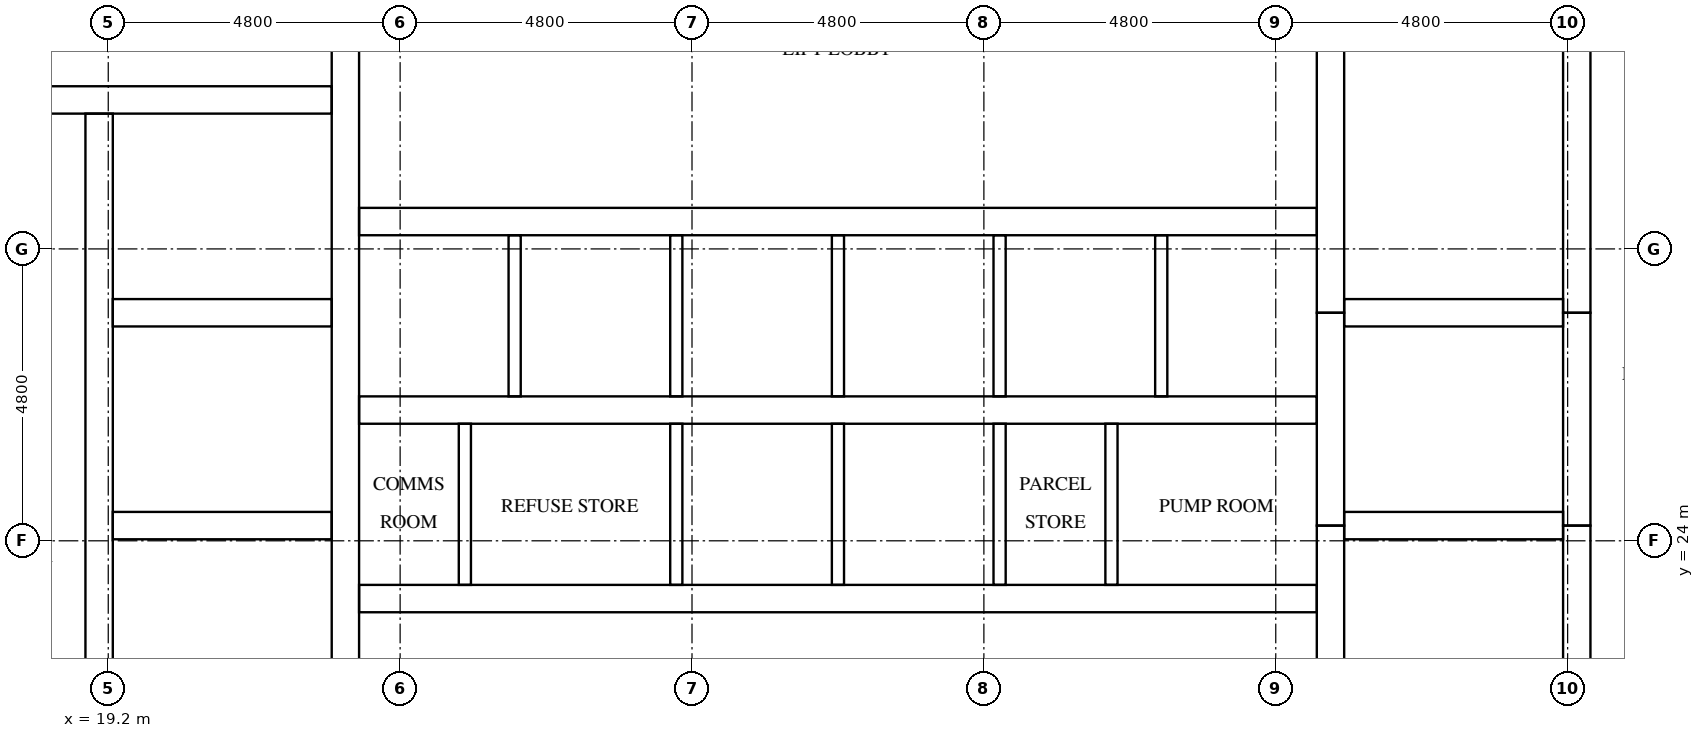
"""IFC4 building model, lengths in metres.
Left out: names, types, materials, properties, quantities, classifications, styles, units other than length and angle.
Written with IfcOpenShell. Run it as: python <this file> out.ifc"""

import sys

from ifc_helpers import new_model, si_unit, direction, frame, frame_2d, origin, place, context, subcontext, project, spatial, rectangle, extrude, element, fill, save


model = new_model("IFC4")
c1 = context("Model", 3, precision=1e-05, world=origin(), true_north=direction((0.0, 1.0)))
c2 = subcontext(c1, "Body", "Model", "MODEL_VIEW")
j1 = project(units=[si_unit("LENGTHUNIT", "METRE"), si_unit("PLANEANGLEUNIT", "RADIAN")], contexts=[c1])
p1 = place(None, origin())
s1 = spatial("IfcSite", under=j1, at=p1, CompositionType="ELEMENT")
p2 = place(p1, origin())
s2 = spatial("IfcBuilding", under=s1, at=p2, CompositionType="ELEMENT")
p3 = place(p2, frame((0.0, 0.0, 256.2)))
s3 = spatial("IfcBuildingStorey", under=s2, at=p3, CompositionType="ELEMENT", Elevation=256.2)
p4 = place(p3, frame((19.05, 15.6, 0.0), z_axis=(0.0, 0.0, 1.0), x_axis=(0.0, 1.0, 0.0)))
e1 = element("IfcWall", 1, at=p4, inside=s3, PredefinedType="SHEAR", context=c2, shape_type="SweptSolid", body=[
    extrude(rectangle(XDim=15.425, YDim=0.45, at=frame_2d((7.712, 0.0))), origin(), (0.0, 0.0, 1.0), 3.2),
])
p5 = place(p4, frame((9.85, 0.0, 0.0)))
e2 = element("IfcOpeningElement", 2, at=p5, cuts=e1, PredefinedType="OPENING", context=c2, shape_type="SweptSolid", body=[
    extrude(rectangle(XDim=1.1, YDim=2.1, at=frame_2d((0.55, 1.05))), frame((0.0, 0.235, 0.0), z_axis=(0.0, -1.0, 0.0), x_axis=(1.0, 0.0, 0.0)), (0.0, 0.0, 1.0), 0.47),
])
p6 = place(p4, frame((13.35, 0.0, 0.0)))
e3 = element("IfcOpeningElement", 3, at=p6, cuts=e1, PredefinedType="OPENING", context=c2, shape_type="SweptSolid", body=[
    extrude(rectangle(XDim=1.1, YDim=2.1, at=frame_2d((0.55, 1.05))), frame((0.0, 0.235, 0.0), z_axis=(0.0, -1.0, 0.0), x_axis=(1.0, 0.0, 0.0)), (0.0, 0.0, 1.0), 0.47),
])
p7 = place(p4, frame((0.6, 0.0, 0.0)))
e4 = element("IfcOpeningElement", 4, at=p7, cuts=e1, PredefinedType="OPENING", context=c2, shape_type="SweptSolid", body=[
    extrude(rectangle(XDim=1.2, YDim=2.1, at=frame_2d((0.6, 1.05))), frame((0.0, 0.235, 0.0), z_axis=(0.0, -1.0, 0.0), x_axis=(1.0, 0.0, 0.0)), (0.0, 0.0, 1.0), 0.47),
])
p8 = place(p3, frame((23.1, 15.6, 0.0), z_axis=(0.0, 0.0, 1.0), x_axis=(0.0, 1.0, 0.0)))
e5 = element("IfcWall", 5, at=p8, inside=s3, PredefinedType="SHEAR", context=c2, shape_type="SweptSolid", body=[
    extrude(rectangle(XDim=21.6, YDim=0.45, at=frame_2d((10.8, 0.0))), origin(), (0.0, 0.0, 1.0), 3.2),
])
p9 = place(p3, frame((39.3, 15.6, 0.0), z_axis=(0.0, 0.0, 1.0), x_axis=(0.0, 1.0, 0.0)))
e6 = element("IfcWall", 6, at=p9, inside=s3, PredefinedType="SHEAR", context=c2, shape_type="SweptSolid", body=[
    extrude(rectangle(XDim=8.65, YDim=0.45, at=frame_2d((4.325, 0.0))), origin(), (0.0, 0.0, 1.0), 3.2),
])
p10 = place(p3, frame((39.3, 24.25, 0.0), z_axis=(0.0, 0.0, 1.0), x_axis=(0.0, 1.0, 0.0)))
e7 = element("IfcWall", 7, at=p10, inside=s3, PredefinedType="SHEAR", context=c2, shape_type="SweptSolid", body=[
    extrude(rectangle(XDim=3.5, YDim=0.45, at=frame_2d((1.75, 0.0))), origin(), (0.0, 0.0, 1.0), 3.2),
])
p11 = place(p3, frame((39.3, 27.75, 0.0), z_axis=(0.0, 0.0, 1.0), x_axis=(0.0, 1.0, 0.0)))
e8 = element("IfcWall", 8, at=p11, inside=s3, PredefinedType="SHEAR", context=c2, shape_type="SweptSolid", body=[
    extrude(rectangle(XDim=9.45, YDim=0.45, at=frame_2d((4.725, 0.0))), origin(), (0.0, 0.0, 1.0), 3.2),
])
p12 = place(p3, frame((43.35, 15.6, 0.0), z_axis=(0.0, 0.0, 1.0), x_axis=(0.0, 1.0, 0.0)))
e9 = element("IfcWall", 9, at=p12, inside=s3, PredefinedType="SHEAR", context=c2, shape_type="SweptSolid", body=[
    extrude(rectangle(XDim=8.65, YDim=0.45, at=frame_2d((4.325, 0.0))), origin(), (0.0, 0.0, 1.0), 3.2),
])
p13 = place(p12, frame((0.6, 0.0, 0.0)))
e10 = element("IfcOpeningElement", 10, at=p13, cuts=e9, PredefinedType="OPENING", context=c2, shape_type="SweptSolid", body=[
    extrude(rectangle(XDim=1.2, YDim=2.1, at=frame_2d((0.6, 1.05))), frame((0.0, 0.235, 0.0), z_axis=(0.0, -1.0, 0.0), x_axis=(1.0, 0.0, 0.0)), (0.0, 0.0, 1.0), 0.47),
])
p14 = place(p3, frame((43.35, 24.25, 0.0), z_axis=(0.0, 0.0, 1.0), x_axis=(0.0, 1.0, 0.0)))
e11 = element("IfcWall", 11, at=p14, inside=s3, PredefinedType="SHEAR", context=c2, shape_type="SweptSolid", body=[
    extrude(rectangle(XDim=3.5, YDim=0.45, at=frame_2d((1.75, 0.0))), origin(), (0.0, 0.0, 1.0), 3.2),
])
p15 = place(p14, frame((1.2, 0.0, 0.0)))
e12 = element("IfcOpeningElement", 12, at=p15, cuts=e11, PredefinedType="OPENING", context=c2, shape_type="SweptSolid", body=[
    extrude(rectangle(XDim=1.1, YDim=2.1, at=frame_2d((0.55, 1.05))), frame((0.0, 0.235, 0.0), z_axis=(0.0, -1.0, 0.0), x_axis=(1.0, 0.0, 0.0)), (0.0, 0.0, 1.0), 0.47),
])
p16 = place(p3, frame((43.35, 27.75, 0.0), z_axis=(0.0, 0.0, 1.0), x_axis=(0.0, 1.0, 0.0)))
e13 = element("IfcWall", 13, at=p16, inside=s3, PredefinedType="SHEAR", context=c2, shape_type="SweptSolid", body=[
    extrude(rectangle(XDim=9.45, YDim=0.45, at=frame_2d((4.725, 0.0))), origin(), (0.0, 0.0, 1.0), 3.2),
])
p17 = place(p16, frame((7.65, 0.0, 0.0)))
e14 = element("IfcOpeningElement", 14, at=p17, cuts=e13, PredefinedType="OPENING", context=c2, shape_type="SweptSolid", body=[
    extrude(rectangle(XDim=1.2, YDim=2.1, at=frame_2d((0.6, 1.05))), frame((0.0, 0.235, 0.0), z_axis=(0.0, -1.0, 0.0), x_axis=(1.0, 0.0, 0.0)), (0.0, 0.0, 1.0), 0.47),
])
for number, where, z_axis, x_axis in (
    (15, (19.275, 24.25, 0.0), (0.0, 0.0, 1.0), (1.0, 0.0, 0.0)),
    (16, (19.275, 27.75, 0.0), (0.0, 0.0, 1.0), (1.0, 0.0, 0.0)),
):
    element("IfcWall", number, at=place(p3, frame(where, z_axis=z_axis, x_axis=x_axis)), inside=s3, PredefinedType="SHEAR", context=c2, shape_type="SweptSolid", body=[
        extrude(rectangle(XDim=3.6, YDim=0.45, at=frame_2d((1.8, 0.0))), origin(), (0.0, 0.0, 1.0), 3.2),
    ])
p18 = place(p3, frame((15.6, 31.25, 0.0), z_axis=(0.0, 0.0, 1.0), x_axis=(1.0, 0.0, 0.0)))
e17 = element("IfcWall", 17, at=p18, inside=s3, PredefinedType="SHEAR", context=c2, shape_type="SweptSolid", body=[
    extrude(rectangle(XDim=7.275, YDim=0.45, at=frame_2d((3.637, 0.0))), origin(), (0.0, 0.0, 1.0), 3.2),
])
for number, where, z_axis, x_axis in (
    (18, (39.525, 24.25, 0.0), (0.0, 0.0, 1.0), (1.0, 0.0, 0.0)),
    (19, (39.525, 27.75, 0.0), (0.0, 0.0, 1.0), (1.0, 0.0, 0.0)),
):
    element("IfcWall", number, at=place(p3, frame(where, z_axis=z_axis, x_axis=x_axis)), inside=s3, PredefinedType="SHEAR", context=c2, shape_type="SweptSolid", body=[
        extrude(rectangle(XDim=3.6, YDim=0.45, at=frame_2d((1.8, 0.0))), origin(), (0.0, 0.0, 1.0), 3.2),
    ])
p19 = place(p3, frame((23.325, 23.05, 0.0), z_axis=(0.0, 0.0, 1.0), x_axis=(1.0, 0.0, 0.0)))
e20 = element("IfcWall", 20, at=p19, inside=s3, PredefinedType="SHEAR", context=c2, shape_type="SweptSolid", body=[
    extrude(rectangle(XDim=15.75, YDim=0.45, at=frame_2d((7.875, 0.0))), origin(), (0.0, 0.0, 1.0), 3.2),
])
p20 = place(p19, frame((0.32, 0.0, 0.0)))
e21 = element("IfcOpeningElement", 21, at=p20, cuts=e20, PredefinedType="OPENING", context=c2, shape_type="SweptSolid", body=[
    extrude(rectangle(XDim=1.0, YDim=2.1, at=frame_2d((0.5, 1.05))), frame((0.0, 0.235, 0.0), z_axis=(0.0, -1.0, 0.0), x_axis=(1.0, 0.0, 0.0)), (0.0, 0.0, 1.0), 0.47),
])
p21 = place(p19, frame((2.978, 0.0, 0.0)))
e22 = element("IfcOpeningElement", 22, at=p21, cuts=e20, PredefinedType="OPENING", context=c2, shape_type="SweptSolid", body=[
    extrude(rectangle(XDim=1.0, YDim=2.1, at=frame_2d((0.5, 1.05))), frame((0.0, 0.235, 0.0), z_axis=(0.0, -1.0, 0.0), x_axis=(1.0, 0.0, 0.0)), (0.0, 0.0, 1.0), 0.47),
])
p22 = place(p19, frame((10.953, 0.0, 0.0)))
e23 = element("IfcOpeningElement", 23, at=p22, cuts=e20, PredefinedType="OPENING", context=c2, shape_type="SweptSolid", body=[
    extrude(rectangle(XDim=1.0, YDim=2.1, at=frame_2d((0.5, 1.05))), frame((0.0, 0.235, 0.0), z_axis=(0.0, -1.0, 0.0), x_axis=(1.0, 0.0, 0.0)), (0.0, 0.0, 1.0), 0.47),
])
p23 = place(p19, frame((13.612, 0.0, 0.0)))
e24 = element("IfcOpeningElement", 24, at=p23, cuts=e20, PredefinedType="OPENING", context=c2, shape_type="SweptSolid", body=[
    extrude(rectangle(XDim=1.0, YDim=2.1, at=frame_2d((0.5, 1.05))), frame((0.0, 0.235, 0.0), z_axis=(0.0, -1.0, 0.0), x_axis=(1.0, 0.0, 0.0)), (0.0, 0.0, 1.0), 0.47),
])
p24 = place(p3, frame((23.325, 26.15, 0.0), z_axis=(0.0, 0.0, 1.0), x_axis=(1.0, 0.0, 0.0)))
e25 = element("IfcWall", 25, at=p24, inside=s3, PredefinedType="SHEAR", context=c2, shape_type="SweptSolid", body=[
    extrude(rectangle(XDim=15.75, YDim=0.45, at=frame_2d((7.875, 0.0))), origin(), (0.0, 0.0, 1.0), 3.2),
])
p25 = place(p3, frame((23.325, 29.25, 0.0), z_axis=(0.0, 0.0, 1.0), x_axis=(1.0, 0.0, 0.0)))
e26 = element("IfcWall", 26, at=p25, inside=s3, PredefinedType="SHEAR", context=c2, shape_type="SweptSolid", body=[
    extrude(rectangle(XDim=15.75, YDim=0.45, at=frame_2d((7.875, 0.0))), origin(), (0.0, 0.0, 1.0), 3.2),
])
p26 = place(p25, frame((0.679, 0.0, 0.0)))
e27 = element("IfcOpeningElement", 27, at=p26, cuts=e26, PredefinedType="OPENING", context=c2, shape_type="SweptSolid", body=[
    extrude(rectangle(XDim=1.1, YDim=2.1, at=frame_2d((0.55, 1.05))), frame((0.0, 0.235, 0.0), z_axis=(0.0, -1.0, 0.0), x_axis=(1.0, 0.0, 0.0)), (0.0, 0.0, 1.0), 0.47),
])
p27 = place(p25, frame((3.337, 0.0, 0.0)))
e28 = element("IfcOpeningElement", 28, at=p27, cuts=e26, PredefinedType="OPENING", context=c2, shape_type="SweptSolid", body=[
    extrude(rectangle(XDim=1.1, YDim=2.1, at=frame_2d((0.55, 1.05))), frame((0.0, 0.235, 0.0), z_axis=(0.0, -1.0, 0.0), x_axis=(1.0, 0.0, 0.0)), (0.0, 0.0, 1.0), 0.47),
])
p28 = place(p25, frame((5.996, 0.0, 0.0)))
e29 = element("IfcOpeningElement", 29, at=p28, cuts=e26, PredefinedType="OPENING", context=c2, shape_type="SweptSolid", body=[
    extrude(rectangle(XDim=1.1, YDim=2.1, at=frame_2d((0.55, 1.05))), frame((0.0, 0.235, 0.0), z_axis=(0.0, -1.0, 0.0), x_axis=(1.0, 0.0, 0.0)), (0.0, 0.0, 1.0), 0.47),
])
p29 = place(p25, frame((8.654, 0.0, 0.0)))
e30 = element("IfcOpeningElement", 30, at=p29, cuts=e26, PredefinedType="OPENING", context=c2, shape_type="SweptSolid", body=[
    extrude(rectangle(XDim=1.1, YDim=2.1, at=frame_2d((0.55, 1.05))), frame((0.0, 0.235, 0.0), z_axis=(0.0, -1.0, 0.0), x_axis=(1.0, 0.0, 0.0)), (0.0, 0.0, 1.0), 0.47),
])
p30 = place(p25, frame((11.312, 0.0, 0.0)))
e31 = element("IfcOpeningElement", 31, at=p30, cuts=e26, PredefinedType="OPENING", context=c2, shape_type="SweptSolid", body=[
    extrude(rectangle(XDim=1.1, YDim=2.1, at=frame_2d((0.55, 1.05))), frame((0.0, 0.235, 0.0), z_axis=(0.0, -1.0, 0.0), x_axis=(1.0, 0.0, 0.0)), (0.0, 0.0, 1.0), 0.47),
])
p31 = place(p25, frame((13.971, 0.0, 0.0)))
e32 = element("IfcOpeningElement", 32, at=p31, cuts=e26, PredefinedType="OPENING", context=c2, shape_type="SweptSolid", body=[
    extrude(rectangle(XDim=1.1, YDim=2.1, at=frame_2d((0.55, 1.05))), frame((0.0, 0.235, 0.0), z_axis=(0.0, -1.0, 0.0), x_axis=(1.0, 0.0, 0.0)), (0.0, 0.0, 1.0), 0.47),
])
p32 = place(p3, frame((25.883, 26.375, 0.0), z_axis=(0.0, 0.0, 1.0), x_axis=(0.0, 1.0, 0.0)))
e33 = element("IfcWall", 33, at=p32, inside=s3, PredefinedType="SOLIDWALL", context=c2, shape_type="SweptSolid", body=[
    extrude(rectangle(XDim=2.65, YDim=0.2, at=frame_2d((1.325, 0.0))), origin(), (0.0, 0.0, 1.0), 3.2),
])
p33 = place(p3, frame((28.542, 23.275, 0.0), z_axis=(0.0, 0.0, 1.0), x_axis=(0.0, 1.0, 0.0)))
e34 = element("IfcWall", 34, at=p33, inside=s3, PredefinedType="SOLIDWALL", context=c2, shape_type="SweptSolid", body=[
    extrude(rectangle(XDim=2.65, YDim=0.2, at=frame_2d((1.325, 0.0))), origin(), (0.0, 0.0, 1.0), 3.2),
])
p34 = place(p3, frame((28.542, 26.375, 0.0), z_axis=(0.0, 0.0, 1.0), x_axis=(0.0, 1.0, 0.0)))
e35 = element("IfcWall", 35, at=p34, inside=s3, PredefinedType="SOLIDWALL", context=c2, shape_type="SweptSolid", body=[
    extrude(rectangle(XDim=2.65, YDim=0.2, at=frame_2d((1.325, 0.0))), origin(), (0.0, 0.0, 1.0), 3.2),
])
p35 = place(p3, frame((31.2, 23.275, 0.0), z_axis=(0.0, 0.0, 1.0), x_axis=(0.0, 1.0, 0.0)))
e36 = element("IfcWall", 36, at=p35, inside=s3, PredefinedType="SOLIDWALL", context=c2, shape_type="SweptSolid", body=[
    extrude(rectangle(XDim=2.65, YDim=0.2, at=frame_2d((1.325, 0.0))), origin(), (0.0, 0.0, 1.0), 3.2),
])
p36 = place(p3, frame((31.2, 26.375, 0.0), z_axis=(0.0, 0.0, 1.0), x_axis=(0.0, 1.0, 0.0)))
e37 = element("IfcWall", 37, at=p36, inside=s3, PredefinedType="SOLIDWALL", context=c2, shape_type="SweptSolid", body=[
    extrude(rectangle(XDim=2.65, YDim=0.2, at=frame_2d((1.325, 0.0))), origin(), (0.0, 0.0, 1.0), 3.2),
])
p37 = place(p3, frame((33.858, 23.275, 0.0), z_axis=(0.0, 0.0, 1.0), x_axis=(0.0, 1.0, 0.0)))
e38 = element("IfcWall", 38, at=p37, inside=s3, PredefinedType="SOLIDWALL", context=c2, shape_type="SweptSolid", body=[
    extrude(rectangle(XDim=2.65, YDim=0.2, at=frame_2d((1.325, 0.0))), origin(), (0.0, 0.0, 1.0), 3.2),
])
for number, where, z_axis, x_axis in (
    (39, (33.858, 26.375, 0.0), (0.0, 0.0, 1.0), (0.0, 1.0, 0.0)),
    (40, (36.517, 26.375, 0.0), (0.0, 0.0, 1.0), (0.0, 1.0, 0.0)),
):
    element("IfcWall", number, at=place(p3, frame(where, z_axis=z_axis, x_axis=x_axis)), inside=s3, PredefinedType="SOLIDWALL", context=c2, shape_type="SweptSolid", body=[
        extrude(rectangle(XDim=2.65, YDim=0.2, at=frame_2d((1.325, 0.0))), origin(), (0.0, 0.0, 1.0), 3.2),
    ])
for number, where, z_axis, x_axis in (
    (41, (25.065, 23.275, 0.0), (0.0, 0.0, 1.0), (0.0, 1.0, 0.0)),
    (42, (35.698, 23.275, 0.0), (0.0, 0.0, 1.0), (0.0, 1.0, 0.0)),
):
    element("IfcWall", number, at=place(p3, frame(where, z_axis=z_axis, x_axis=x_axis)), inside=s3, PredefinedType="PARTITIONING", context=c2, shape_type="SweptSolid", body=[
        extrude(rectangle(XDim=2.65, YDim=0.2, at=frame_2d((1.325, 0.0))), origin(), (0.0, 0.0, 1.0), 3.2),
    ])
p38 = place(p26, origin())
e43 = element("IfcDoor", 43, at=p38, inside=s3, OperationType="DOUBLE_DOOR_SLIDING", PredefinedType="DOOR", context=c2, shape_type="SweptSolid", body=[
    extrude(rectangle(XDim=1.1, YDim=2.1, at=frame_2d((0.55, 1.05))), frame((0.0, 0.025, 0.0), z_axis=(0.0, -1.0, 0.0), x_axis=(1.0, 0.0, 0.0)), (0.0, 0.0, 1.0), 0.05),
])
fill(e27, e43)
p39 = place(p27, origin())
e44 = element("IfcDoor", 44, at=p39, inside=s3, OperationType="DOUBLE_DOOR_SLIDING", PredefinedType="DOOR", context=c2, shape_type="SweptSolid", body=[
    extrude(rectangle(XDim=1.1, YDim=2.1, at=frame_2d((0.55, 1.05))), frame((0.0, 0.025, 0.0), z_axis=(0.0, -1.0, 0.0), x_axis=(1.0, 0.0, 0.0)), (0.0, 0.0, 1.0), 0.05),
])
fill(e28, e44)
p40 = place(p28, origin())
e45 = element("IfcDoor", 45, at=p40, inside=s3, OperationType="DOUBLE_DOOR_SLIDING", PredefinedType="DOOR", context=c2, shape_type="SweptSolid", body=[
    extrude(rectangle(XDim=1.1, YDim=2.1, at=frame_2d((0.55, 1.05))), frame((0.0, 0.025, 0.0), z_axis=(0.0, -1.0, 0.0), x_axis=(1.0, 0.0, 0.0)), (0.0, 0.0, 1.0), 0.05),
])
fill(e29, e45)
p41 = place(p29, origin())
e46 = element("IfcDoor", 46, at=p41, inside=s3, OperationType="DOUBLE_DOOR_SLIDING", PredefinedType="DOOR", context=c2, shape_type="SweptSolid", body=[
    extrude(rectangle(XDim=1.1, YDim=2.1, at=frame_2d((0.55, 1.05))), frame((0.0, 0.025, 0.0), z_axis=(0.0, -1.0, 0.0), x_axis=(1.0, 0.0, 0.0)), (0.0, 0.0, 1.0), 0.05),
])
fill(e30, e46)
p42 = place(p30, origin())
e47 = element("IfcDoor", 47, at=p42, inside=s3, OperationType="DOUBLE_DOOR_SLIDING", PredefinedType="DOOR", context=c2, shape_type="SweptSolid", body=[
    extrude(rectangle(XDim=1.1, YDim=2.1, at=frame_2d((0.55, 1.05))), frame((0.0, 0.025, 0.0), z_axis=(0.0, -1.0, 0.0), x_axis=(1.0, 0.0, 0.0)), (0.0, 0.0, 1.0), 0.05),
])
fill(e31, e47)
p43 = place(p31, origin())
e48 = element("IfcDoor", 48, at=p43, inside=s3, OperationType="DOUBLE_DOOR_SLIDING", PredefinedType="DOOR", context=c2, shape_type="SweptSolid", body=[
    extrude(rectangle(XDim=1.1, YDim=2.1, at=frame_2d((0.55, 1.05))), frame((0.0, 0.025, 0.0), z_axis=(0.0, -1.0, 0.0), x_axis=(1.0, 0.0, 0.0)), (0.0, 0.0, 1.0), 0.05),
])
fill(e32, e48)
p44 = place(p5, origin())
e49 = element("IfcDoor", 49, at=p44, inside=s3, OperationType="DOUBLE_DOOR_SLIDING", PredefinedType="DOOR", context=c2, shape_type="SweptSolid", body=[
    extrude(rectangle(XDim=1.1, YDim=2.1, at=frame_2d((0.55, 1.05))), frame((0.0, 0.025, 0.0), z_axis=(0.0, -1.0, 0.0), x_axis=(1.0, 0.0, 0.0)), (0.0, 0.0, 1.0), 0.05),
])
fill(e2, e49)
p45 = place(p6, origin())
e50 = element("IfcDoor", 50, at=p45, inside=s3, OperationType="DOUBLE_DOOR_SLIDING", PredefinedType="DOOR", context=c2, shape_type="SweptSolid", body=[
    extrude(rectangle(XDim=1.1, YDim=2.1, at=frame_2d((0.55, 1.05))), frame((0.0, 0.025, 0.0), z_axis=(0.0, -1.0, 0.0), x_axis=(1.0, 0.0, 0.0)), (0.0, 0.0, 1.0), 0.05),
])
fill(e3, e50)
p46 = place(p15, origin())
e51 = element("IfcDoor", 51, at=p46, inside=s3, OperationType="DOUBLE_DOOR_SLIDING", PredefinedType="DOOR", context=c2, shape_type="SweptSolid", body=[
    extrude(rectangle(XDim=1.1, YDim=2.1, at=frame_2d((0.55, 1.05))), frame((0.0, 0.025, 0.0), z_axis=(0.0, -1.0, 0.0), x_axis=(1.0, 0.0, 0.0)), (0.0, 0.0, 1.0), 0.05),
])
fill(e12, e51)
p47 = place(p20, frame((1.0, 0.0, 0.0), z_axis=(0.0, 0.0, 1.0), x_axis=(-1.0, 0.0, 0.0)))
e52 = element("IfcDoor", 52, at=p47, inside=s3, OperationType="SINGLE_SWING_RIGHT", PredefinedType="DOOR", context=c2, shape_type="SweptSolid", body=[
    extrude(rectangle(XDim=1.0, YDim=2.1, at=frame_2d((0.5, 1.05))), frame((0.0, 0.025, 0.0), z_axis=(0.0, -1.0, 0.0), x_axis=(1.0, 0.0, 0.0)), (0.0, 0.0, 1.0), 0.05),
])
fill(e21, e52)
p48 = place(p21, frame((1.0, 0.0, 0.0), z_axis=(0.0, 0.0, 1.0), x_axis=(-1.0, 0.0, 0.0)))
e53 = element("IfcDoor", 53, at=p48, inside=s3, OperationType="SINGLE_SWING_LEFT", PredefinedType="DOOR", context=c2, shape_type="SweptSolid", body=[
    extrude(rectangle(XDim=1.0, YDim=2.1, at=frame_2d((0.5, 1.05))), frame((0.0, 0.025, 0.0), z_axis=(0.0, -1.0, 0.0), x_axis=(1.0, 0.0, 0.0)), (0.0, 0.0, 1.0), 0.05),
])
fill(e22, e53)
p49 = place(p22, frame((1.0, 0.0, 0.0), z_axis=(0.0, 0.0, 1.0), x_axis=(-1.0, 0.0, 0.0)))
e54 = element("IfcDoor", 54, at=p49, inside=s3, OperationType="SINGLE_SWING_RIGHT", PredefinedType="DOOR", context=c2, shape_type="SweptSolid", body=[
    extrude(rectangle(XDim=1.0, YDim=2.1, at=frame_2d((0.5, 1.05))), frame((0.0, 0.025, 0.0), z_axis=(0.0, -1.0, 0.0), x_axis=(1.0, 0.0, 0.0)), (0.0, 0.0, 1.0), 0.05),
])
fill(e23, e54)
p50 = place(p23, frame((1.0, 0.0, 0.0), z_axis=(0.0, 0.0, 1.0), x_axis=(-1.0, 0.0, 0.0)))
e55 = element("IfcDoor", 55, at=p50, inside=s3, OperationType="SINGLE_SWING_LEFT", PredefinedType="DOOR", context=c2, shape_type="SweptSolid", body=[
    extrude(rectangle(XDim=1.0, YDim=2.1, at=frame_2d((0.5, 1.05))), frame((0.0, 0.025, 0.0), z_axis=(0.0, -1.0, 0.0), x_axis=(1.0, 0.0, 0.0)), (0.0, 0.0, 1.0), 0.05),
])
fill(e24, e55)
save(model, sys.argv[1])
